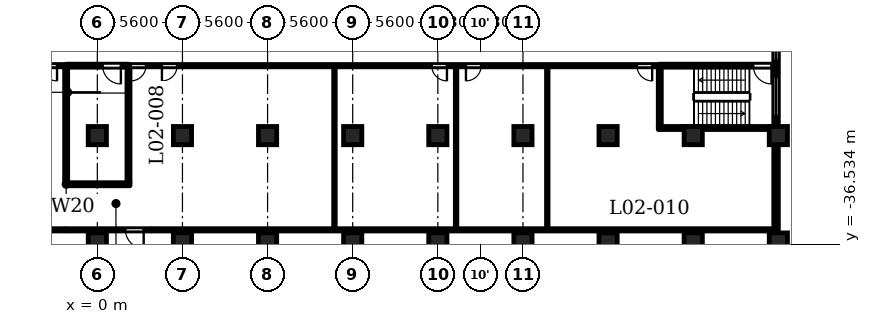
"""IFC4 building model, lengths in metres.
Left out: names, types, materials, properties, quantities, classifications, styles, units other than length and angle.
Written with IfcOpenShell. Run it as: python <this file> out.ifc"""

import sys

from ifc_helpers import new_model, si_unit, direction, frame, frame_2d, origin, origin_2d, place, context, subcontext, project, spatial, rectangle, circle, extrude, element, fill, save


model = new_model("IFC4")
c1 = context("Model", 3, precision=1e-05, world=origin(), true_north=direction((0.0, 1.0)))
c2 = subcontext(c1, "Body", "Model", "MODEL_VIEW")
j1 = project(units=[si_unit("LENGTHUNIT", "METRE"), si_unit("PLANEANGLEUNIT", "RADIAN")], contexts=[c1])
p1 = place(None, origin())
s1 = spatial("IfcSite", under=j1, at=p1, CompositionType="ELEMENT")
p2 = place(p1, origin())
s2 = spatial("IfcBuilding", under=s1, at=p2, CompositionType="ELEMENT")
p3 = place(p2, frame((0.0, 0.0, 11.3)))
s3 = spatial("IfcBuildingStorey", under=s2, at=p3, CompositionType="ELEMENT", Elevation=11.3)
for number, where, z_axis, x_axis in (
    (1, (0.0, -29.4, 0.0), (0.0, 0.0, 1.0), (1.0, 0.0, 0.0)),
    (2, (5.6, -29.4, 0.0), (0.0, 0.0, 1.0), (1.0, 0.0, 0.0)),
    (3, (11.2, -29.4, 0.0), (0.0, 0.0, 1.0), (1.0, 0.0, 0.0)),
    (4, (16.8, -29.4, 0.0), (0.0, 0.0, 1.0), (1.0, 0.0, 0.0)),
    (5, (22.4, -29.4, 0.0), (0.0, 0.0, 1.0), (1.0, 0.0, 0.0)),
    (6, (28.0, -29.4, 0.0), (0.0, 0.0, 1.0), (1.0, 0.0, 0.0)),
    (7, (33.6, -29.4, 0.0), (0.0, 0.0, 1.0), (1.0, 0.0, 0.0)),
    (8, (39.2, -29.4, 0.0), (0.0, 0.0, 1.0), (1.0, 0.0, 0.0)),
    (9, (44.8, -29.4, 0.0), (0.0, 0.0, 1.0), (1.0, 0.0, 0.0)),
    (10, (0.0, -36.4, 0.0), (0.0, 0.0, 1.0), (1.0, 0.0, 0.0)),
    (11, (5.6, -36.4, 0.0), (0.0, 0.0, 1.0), (1.0, 0.0, 0.0)),
    (12, (11.2, -36.4, 0.0), (0.0, 0.0, 1.0), (1.0, 0.0, 0.0)),
    (13, (16.8, -36.4, 0.0), (0.0, 0.0, 1.0), (1.0, 0.0, 0.0)),
    (14, (22.4, -36.4, 0.0), (0.0, 0.0, 1.0), (1.0, 0.0, 0.0)),
    (15, (28.0, -36.4, 0.0), (0.0, 0.0, 1.0), (1.0, 0.0, 0.0)),
    (16, (33.6, -36.4, 0.0), (0.0, 0.0, 1.0), (1.0, 0.0, 0.0)),
    (17, (39.2, -36.4, 0.0), (0.0, 0.0, 1.0), (1.0, 0.0, 0.0)),
    (18, (44.8, -36.4, 0.0), (0.0, 0.0, 1.0), (1.0, 0.0, 0.0)),
):
    element("IfcColumn", number, at=place(p3, frame(where, z_axis=z_axis, x_axis=x_axis)), inside=s3, PredefinedType="COLUMN", context=c2, shape_type="SweptSolid", body=[
        extrude(circle(Radius=0.6, at=origin_2d()), origin(), (0.0, 0.0, 1.0), 4.8),
    ])
p4 = place(p3, frame((44.65, -35.8, 0.0), z_axis=(0.0, 0.0, 1.0), x_axis=(0.0, 1.0, 0.0)))
e19 = element("IfcWall", 19, at=p4, inside=s3, PredefinedType="SOLIDWALL", context=c2, shape_type="SweptSolid", body=[
    extrude(rectangle(XDim=5.8, YDim=0.3, at=frame_2d((2.9, 0.0))), origin(), (0.0, 0.0, 1.0), 3.65),
])
p5 = place(p3, frame((44.65, -28.8, 0.0), z_axis=(0.0, 0.0, 1.0), x_axis=(0.0, 1.0, 0.0)))
e20 = element("IfcWall", 20, at=p5, inside=s3, PredefinedType="SOLIDWALL", context=c2, shape_type="SweptSolid", body=[
    extrude(rectangle(XDim=5.8, YDim=0.3, at=frame_2d((2.9, 0.0))), origin(), (0.0, 0.0, 1.0), 3.65),
])
p6 = place(p5, frame((0.663, 0.0, 0.9)))
e21 = element("IfcOpeningElement", 21, at=p6, cuts=e20, PredefinedType="OPENING", context=c2, shape_type="SweptSolid", body=[
    extrude(rectangle(XDim=2.6, YDim=1.25, at=frame_2d((1.3, 0.625))), frame((0.0, 0.16, 0.0), z_axis=(0.0, -1.0, 0.0), x_axis=(1.0, 0.0, 0.0)), (0.0, 0.0, 1.0), 0.32),
])
p7 = place(p5, frame((4.337, 0.0, 0.6)))
e22 = element("IfcOpeningElement", 22, at=p7, cuts=e20, PredefinedType="OPENING", context=c2, shape_type="SweptSolid", body=[
    extrude(rectangle(XDim=1.2, YDim=1.55, at=frame_2d((0.6, 0.775))), frame((0.0, 0.16, 0.0), z_axis=(0.0, -1.0, 0.0), x_axis=(1.0, 0.0, 0.0)), (0.0, 0.0, 1.0), 0.32),
])
p8 = place(p3, frame((-44.48, -35.6, 0.0), z_axis=(0.0, 0.0, 1.0), x_axis=(1.0, 0.0, 0.0)))
e23 = element("IfcWall", 23, at=p8, inside=s3, PredefinedType="PARTITIONING", context=c2, shape_type="SweptSolid", body=[
    extrude(rectangle(XDim=42.38, YDim=0.15, at=frame_2d((21.19, 0.0))), origin(), (0.0, 0.0, 1.0), 4.45),
])
p9 = place(p3, frame((-2.05, -35.6, 0.0), z_axis=(0.0, 0.0, 1.0), x_axis=(1.0, 0.0, 0.0)))
e24 = element("IfcWall", 24, at=p9, inside=s3, PredefinedType="PARTITIONING", context=c2, shape_type="SweptSolid", body=[
    extrude(rectangle(XDim=5.6, YDim=0.15, at=frame_2d((2.8, 0.0))), origin(), (0.0, 0.0, 1.0), 4.45),
])
p10 = place(p9, frame((3.9, 0.0, 0.0)))
e25 = element("IfcOpeningElement", 25, at=p10, cuts=e24, PredefinedType="OPENING", context=c2, shape_type="SweptSolid", body=[
    extrude(rectangle(XDim=1.2, YDim=2.1, at=frame_2d((0.6, 1.05))), frame((0.0, 0.085, 0.0), z_axis=(0.0, -1.0, 0.0), x_axis=(1.0, 0.0, 0.0)), (0.0, 0.0, 1.0), 0.17),
])
p11 = place(p3, frame((3.6, -35.6, 0.0), z_axis=(0.0, 0.0, 1.0), x_axis=(1.0, 0.0, 0.0)))
e26 = element("IfcWall", 26, at=p11, inside=s3, PredefinedType="PARTITIONING", context=c2, shape_type="SweptSolid", body=[
    extrude(rectangle(XDim=40.88, YDim=0.15, at=frame_2d((20.44, 0.0))), origin(), (0.0, 0.0, 1.0), 4.45),
])
p12 = place(p3, frame((-2.05, -32.6, 0.0), z_axis=(0.0, 0.0, 1.0), x_axis=(1.0, 0.0, 0.0)))
e27 = element("IfcWall", 27, at=p12, inside=s3, PredefinedType="SHEAR", context=c2, shape_type="SweptSolid", body=[
    extrude(rectangle(XDim=4.2, YDim=0.2, at=frame_2d((2.1, 0.0))), origin(), (0.0, 0.0, 1.0), 4.45),
])
p13 = place(p3, frame((36.9, -28.9, 0.0), z_axis=(0.0, 0.0, 1.0), x_axis=(1.0, 0.0, 0.0)))
e28 = element("IfcWall", 28, at=p13, inside=s3, PredefinedType="SHEAR", context=c2, shape_type="SweptSolid", body=[
    extrude(rectangle(XDim=7.81, YDim=0.2, at=frame_2d((3.905, 0.0))), origin(), (0.0, 0.0, 1.0), 4.45),
])
p14 = place(p3, frame((-37.0, -24.8, 0.0), z_axis=(0.0, 0.0, 1.0), x_axis=(1.0, 0.0, 0.0)))
e29 = element("IfcWall", 29, at=p14, inside=s3, PredefinedType="PARTITIONING", context=c2, shape_type="SweptSolid", body=[
    extrude(rectangle(XDim=34.9, YDim=0.15, at=frame_2d((17.45, 0.0))), origin(), (0.0, 0.0, 1.0), 4.45),
])
p15 = place(p14, frame((0.65, 0.0, 0.0)))
e30 = element("IfcOpeningElement", 30, at=p15, cuts=e29, PredefinedType="OPENING", context=c2, shape_type="SweptSolid", body=[
    extrude(rectangle(XDim=1.0, YDim=2.1, at=frame_2d((0.5, 1.05))), frame((0.0, 0.085, 0.0), z_axis=(0.0, -1.0, 0.0), x_axis=(1.0, 0.0, 0.0)), (0.0, 0.0, 1.0), 0.17),
])
p16 = place(p14, frame((9.6, 0.0, 0.0)))
e31 = element("IfcOpeningElement", 31, at=p16, cuts=e29, PredefinedType="OPENING", context=c2, shape_type="SweptSolid", body=[
    extrude(rectangle(XDim=1.0, YDim=2.1, at=frame_2d((0.5, 1.05))), frame((0.0, 0.085, 0.0), z_axis=(0.0, -1.0, 0.0), x_axis=(1.0, 0.0, 0.0)), (0.0, 0.0, 1.0), 0.17),
])
p17 = place(p14, frame((11.85, 0.0, 0.0)))
e32 = element("IfcOpeningElement", 32, at=p17, cuts=e29, PredefinedType="OPENING", context=c2, shape_type="SweptSolid", body=[
    extrude(rectangle(XDim=1.0, YDim=2.1, at=frame_2d((0.5, 1.05))), frame((0.0, 0.085, 0.0), z_axis=(0.0, -1.0, 0.0), x_axis=(1.0, 0.0, 0.0)), (0.0, 0.0, 1.0), 0.17),
])
p18 = place(p14, frame((33.35, 0.0, 0.0)))
e33 = element("IfcOpeningElement", 33, at=p18, cuts=e29, PredefinedType="OPENING", context=c2, shape_type="SweptSolid", body=[
    extrude(rectangle(XDim=1.0, YDim=2.1, at=frame_2d((0.5, 1.05))), frame((0.0, 0.085, 0.0), z_axis=(0.0, -1.0, 0.0), x_axis=(1.0, 0.0, 0.0)), (0.0, 0.0, 1.0), 0.17),
])
p19 = place(p3, frame((2.05, -24.8, 0.0), z_axis=(0.0, 0.0, 1.0), x_axis=(1.0, 0.0, 0.0)))
e34 = element("IfcWall", 34, at=p19, inside=s3, PredefinedType="PARTITIONING", context=c2, shape_type="SweptSolid", body=[
    extrude(rectangle(XDim=1.5, YDim=0.15, at=frame_2d((0.75, 0.0))), origin(), (0.0, 0.0, 1.0), 4.45),
])
p20 = place(p19, frame((0.15, 0.0, 0.0)))
e35 = element("IfcOpeningElement", 35, at=p20, cuts=e34, PredefinedType="OPENING", context=c2, shape_type="SweptSolid", body=[
    extrude(rectangle(XDim=1.0, YDim=2.1, at=frame_2d((0.5, 1.05))), frame((0.0, 0.085, 0.0), z_axis=(0.0, -1.0, 0.0), x_axis=(1.0, 0.0, 0.0)), (0.0, 0.0, 1.0), 0.17),
])
p21 = place(p3, frame((3.6, -24.8, 0.0), z_axis=(0.0, 0.0, 1.0), x_axis=(1.0, 0.0, 0.0)))
e36 = element("IfcWall", 36, at=p21, inside=s3, PredefinedType="PARTITIONING", context=c2, shape_type="SweptSolid", body=[
    extrude(rectangle(XDim=33.4, YDim=0.15, at=frame_2d((16.7, 0.0))), origin(), (0.0, 0.0, 1.0), 4.45),
])
p22 = place(p21, frame((0.65, 0.0, 0.0)))
e37 = element("IfcOpeningElement", 37, at=p22, cuts=e36, PredefinedType="OPENING", context=c2, shape_type="SweptSolid", body=[
    extrude(rectangle(XDim=1.0, YDim=2.1, at=frame_2d((0.5, 1.05))), frame((0.0, 0.085, 0.0), z_axis=(0.0, -1.0, 0.0), x_axis=(1.0, 0.0, 0.0)), (0.0, 0.0, 1.0), 0.17),
])
p23 = place(p21, frame((18.4, 0.0, 0.0)))
e38 = element("IfcOpeningElement", 38, at=p23, cuts=e36, PredefinedType="OPENING", context=c2, shape_type="SweptSolid", body=[
    extrude(rectangle(XDim=1.0, YDim=2.1, at=frame_2d((0.5, 1.05))), frame((0.0, 0.085, 0.0), z_axis=(0.0, -1.0, 0.0), x_axis=(1.0, 0.0, 0.0)), (0.0, 0.0, 1.0), 0.17),
])
p24 = place(p21, frame((20.65, 0.0, 0.0)))
e39 = element("IfcOpeningElement", 39, at=p24, cuts=e36, PredefinedType="OPENING", context=c2, shape_type="SweptSolid", body=[
    extrude(rectangle(XDim=1.0, YDim=2.1, at=frame_2d((0.5, 1.05))), frame((0.0, 0.085, 0.0), z_axis=(0.0, -1.0, 0.0), x_axis=(1.0, 0.0, 0.0)), (0.0, 0.0, 1.0), 0.17),
])
p25 = place(p21, frame((31.9, 0.0, 0.0)))
e40 = element("IfcOpeningElement", 40, at=p25, cuts=e36, PredefinedType="OPENING", context=c2, shape_type="SweptSolid", body=[
    extrude(rectangle(XDim=1.0, YDim=2.1, at=frame_2d((0.5, 1.05))), frame((0.0, 0.085, 0.0), z_axis=(0.0, -1.0, 0.0), x_axis=(1.0, 0.0, 0.0)), (0.0, 0.0, 1.0), 0.17),
])
p26 = place(p3, frame((-2.05, -24.8, 0.0), z_axis=(0.0, 0.0, 1.0), x_axis=(1.0, 0.0, 0.0)))
e41 = element("IfcWall", 41, at=p26, inside=s3, PredefinedType="SHEAR", context=c2, shape_type="SweptSolid", body=[
    extrude(rectangle(XDim=4.1, YDim=0.2, at=frame_2d((2.05, 0.0))), origin(), (0.0, 0.0, 1.0), 4.45),
])
p27 = place(p26, frame((2.4, 0.0, 0.0)))
e42 = element("IfcOpeningElement", 42, at=p27, cuts=e41, PredefinedType="OPENING", context=c2, shape_type="SweptSolid", body=[
    extrude(rectangle(XDim=1.2, YDim=2.1, at=frame_2d((0.6, 1.05))), frame((0.0, 0.11, 0.0), z_axis=(0.0, -1.0, 0.0), x_axis=(1.0, 0.0, 0.0)), (0.0, 0.0, 1.0), 0.22),
])
p28 = place(p3, frame((37.0, -24.8, 0.0), z_axis=(0.0, 0.0, 1.0), x_axis=(1.0, 0.0, 0.0)))
e43 = element("IfcWall", 43, at=p28, inside=s3, PredefinedType="SHEAR", context=c2, shape_type="SweptSolid", body=[
    extrude(rectangle(XDim=7.71, YDim=0.2, at=frame_2d((3.855, 0.0))), origin(), (0.0, 0.0, 1.0), 4.45),
])
p29 = place(p28, frame((6.15, 0.0, 0.0)))
e44 = element("IfcOpeningElement", 44, at=p29, cuts=e43, PredefinedType="OPENING", context=c2, shape_type="SweptSolid", body=[
    extrude(rectangle(XDim=1.2, YDim=2.1, at=frame_2d((0.6, 1.05))), frame((0.0, 0.11, 0.0), z_axis=(0.0, -1.0, 0.0), x_axis=(1.0, 0.0, 0.0)), (0.0, 0.0, 1.0), 0.22),
])
p30 = place(p3, frame((2.05, -32.5, 0.0), z_axis=(0.0, 0.0, 1.0), x_axis=(0.0, 1.0, 0.0)))
e45 = element("IfcWall", 45, at=p30, inside=s3, PredefinedType="SHEAR", context=c2, shape_type="SweptSolid", body=[
    extrude(rectangle(XDim=7.625, YDim=0.2, at=frame_2d((3.812, 0.0))), origin(), (0.0, 0.0, 1.0), 4.45),
])
for number, where, z_axis, x_axis in (
    (46, (15.6, -35.525, 0.0), (0.0, 0.0, 1.0), (0.0, 1.0, 0.0)),
    (47, (23.6, -35.525, 0.0), (0.0, 0.0, 1.0), (0.0, 1.0, 0.0)),
    (48, (29.6, -35.525, 0.0), (0.0, 0.0, 1.0), (0.0, 1.0, 0.0)),
):
    element("IfcWall", number, at=place(p3, frame(where, z_axis=z_axis, x_axis=x_axis)), inside=s3, PredefinedType="PARTITIONING", context=c2, shape_type="SweptSolid", body=[
        extrude(rectangle(XDim=10.65, YDim=0.1, at=frame_2d((5.325, 0.0))), origin(), (0.0, 0.0, 1.0), 4.45),
    ])
p31 = place(p3, frame((37.0, -28.8, 0.0), z_axis=(0.0, 0.0, 1.0), x_axis=(0.0, 1.0, 0.0)))
e49 = element("IfcWall", 49, at=p31, inside=s3, PredefinedType="SHEAR", context=c2, shape_type="SweptSolid", body=[
    extrude(rectangle(XDim=3.925, YDim=0.2, at=frame_2d((1.962, 0.0))), origin(), (0.0, 0.0, 1.0), 4.45),
])
p32 = place(p3, frame((-2.05, -32.5, 0.0), z_axis=(0.0, 0.0, 1.0), x_axis=(0.0, 1.0, 0.0)))
e50 = element("IfcWall", 50, at=p32, inside=s3, PredefinedType="SHEAR", context=c2, shape_type="SweptSolid", body=[
    extrude(rectangle(XDim=7.6, YDim=0.2, at=frame_2d((3.8, 0.0))), origin(), (0.0, 0.0, 1.0), 4.45),
])
p33 = place(p29, origin())
e51 = element("IfcDoor", 51, at=p33, inside=s3, OperationType="SINGLE_SWING_RIGHT", PredefinedType="DOOR", context=c2, shape_type="SweptSolid", body=[
    extrude(rectangle(XDim=1.2, YDim=2.1, at=frame_2d((0.6, 1.05))), frame((0.0, 0.025, 0.0), z_axis=(0.0, -1.0, 0.0), x_axis=(1.0, 0.0, 0.0)), (0.0, 0.0, 1.0), 0.05),
])
fill(e44, e51)
p34 = place(p27, origin())
e52 = element("IfcDoor", 52, at=p34, inside=s3, OperationType="SINGLE_SWING_RIGHT", PredefinedType="DOOR", context=c2, shape_type="SweptSolid", body=[
    extrude(rectangle(XDim=1.2, YDim=2.1, at=frame_2d((0.6, 1.05))), frame((0.0, 0.025, 0.0), z_axis=(0.0, -1.0, 0.0), x_axis=(1.0, 0.0, 0.0)), (0.0, 0.0, 1.0), 0.05),
])
fill(e42, e52)
p35 = place(p20, origin())
e53 = element("IfcDoor", 53, at=p35, inside=s3, OperationType="SINGLE_SWING_LEFT", PredefinedType="DOOR", context=c2, shape_type="SweptSolid", body=[
    extrude(rectangle(XDim=1.0, YDim=2.1, at=frame_2d((0.5, 1.05))), frame((0.0, 0.025, 0.0), z_axis=(0.0, -1.0, 0.0), x_axis=(1.0, 0.0, 0.0)), (0.0, 0.0, 1.0), 0.05),
])
fill(e35, e53)
p36 = place(p10, origin())
e54 = element("IfcDoor", 54, at=p36, inside=s3, OperationType="SINGLE_SWING_RIGHT", PredefinedType="DOOR", context=c2, shape_type="SweptSolid", body=[
    extrude(rectangle(XDim=1.2, YDim=2.1, at=frame_2d((0.6, 1.05))), frame((0.0, 0.025, 0.0), z_axis=(0.0, -1.0, 0.0), x_axis=(1.0, 0.0, 0.0)), (0.0, 0.0, 1.0), 0.05),
])
fill(e25, e54)
p37 = place(p18, origin())
e55 = element("IfcDoor", 55, at=p37, inside=s3, OperationType="SINGLE_SWING_RIGHT", PredefinedType="DOOR", context=c2, shape_type="SweptSolid", body=[
    extrude(rectangle(XDim=1.0, YDim=2.1, at=frame_2d((0.5, 1.05))), frame((0.0, 0.025, 0.0), z_axis=(0.0, -1.0, 0.0), x_axis=(1.0, 0.0, 0.0)), (0.0, 0.0, 1.0), 0.05),
])
fill(e33, e55)
p38 = place(p22, origin())
e56 = element("IfcDoor", 56, at=p38, inside=s3, OperationType="SINGLE_SWING_LEFT", PredefinedType="DOOR", context=c2, shape_type="SweptSolid", body=[
    extrude(rectangle(XDim=1.0, YDim=2.1, at=frame_2d((0.5, 1.05))), frame((0.0, 0.025, 0.0), z_axis=(0.0, -1.0, 0.0), x_axis=(1.0, 0.0, 0.0)), (0.0, 0.0, 1.0), 0.05),
])
fill(e37, e56)
p39 = place(p23, origin())
e57 = element("IfcDoor", 57, at=p39, inside=s3, OperationType="SINGLE_SWING_RIGHT", PredefinedType="DOOR", context=c2, shape_type="SweptSolid", body=[
    extrude(rectangle(XDim=1.0, YDim=2.1, at=frame_2d((0.5, 1.05))), frame((0.0, 0.025, 0.0), z_axis=(0.0, -1.0, 0.0), x_axis=(1.0, 0.0, 0.0)), (0.0, 0.0, 1.0), 0.05),
])
fill(e38, e57)
p40 = place(p24, origin())
e58 = element("IfcDoor", 58, at=p40, inside=s3, OperationType="SINGLE_SWING_LEFT", PredefinedType="DOOR", context=c2, shape_type="SweptSolid", body=[
    extrude(rectangle(XDim=1.0, YDim=2.1, at=frame_2d((0.5, 1.05))), frame((0.0, 0.025, 0.0), z_axis=(0.0, -1.0, 0.0), x_axis=(1.0, 0.0, 0.0)), (0.0, 0.0, 1.0), 0.05),
])
fill(e39, e58)
p41 = place(p25, origin())
e59 = element("IfcDoor", 59, at=p41, inside=s3, OperationType="SINGLE_SWING_RIGHT", PredefinedType="DOOR", context=c2, shape_type="SweptSolid", body=[
    extrude(rectangle(XDim=1.0, YDim=2.1, at=frame_2d((0.5, 1.05))), frame((0.0, 0.025, 0.0), z_axis=(0.0, -1.0, 0.0), x_axis=(1.0, 0.0, 0.0)), (0.0, 0.0, 1.0), 0.05),
])
fill(e40, e59)
p42 = place(p6, origin())
e60 = element("IfcWindow", 60, at=p42, inside=s3, PartitioningType="SINGLE_PANEL", PredefinedType="WINDOW", context=c2, shape_type="SweptSolid", body=[
    extrude(rectangle(XDim=2.6, YDim=1.25, at=frame_2d((1.3, 0.625))), frame((0.0, 0.03, 0.0), z_axis=(0.0, -1.0, 0.0), x_axis=(1.0, 0.0, 0.0)), (0.0, 0.0, 1.0), 0.06),
])
fill(e21, e60)
p43 = place(p7, origin())
e61 = element("IfcWindow", 61, at=p43, inside=s3, PartitioningType="SINGLE_PANEL", PredefinedType="WINDOW", context=c2, shape_type="SweptSolid", body=[
    extrude(rectangle(XDim=1.2, YDim=1.55, at=frame_2d((0.6, 0.775))), frame((0.0, 0.03, 0.0), z_axis=(0.0, -1.0, 0.0), x_axis=(1.0, 0.0, 0.0)), (0.0, 0.0, 1.0), 0.06),
])
fill(e22, e61)
save(model, sys.argv[1])
